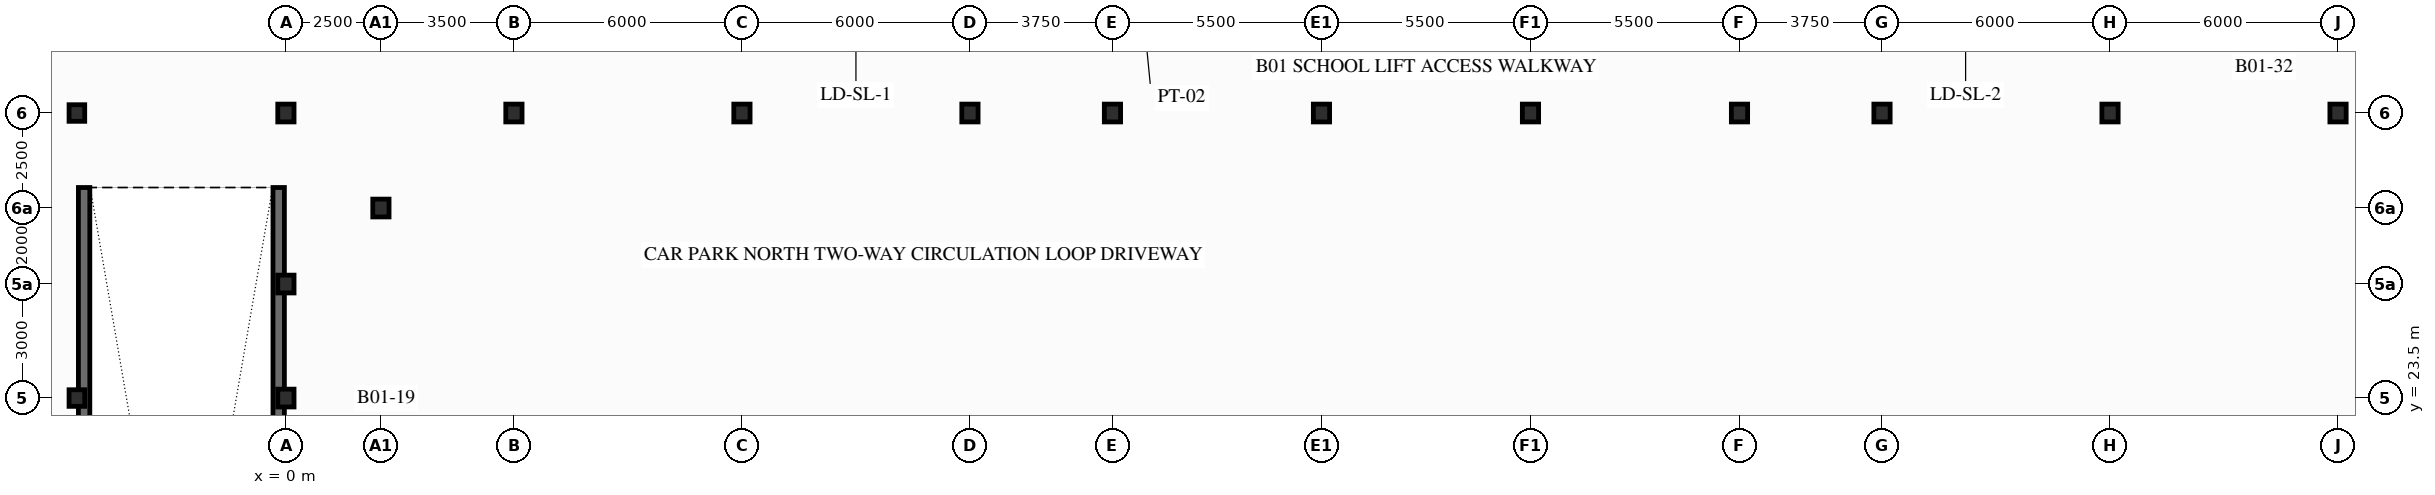
"""IFC4 building model, lengths in metres.
Left out: names, types, materials, properties, quantities, classifications, styles, units other than length and angle.
Written with IfcOpenShell. Run it as: python <this file> out.ifc"""

import sys

from ifc_helpers import new_model, si_unit, direction, frame, frame_2d, origin, origin_2d, place, context, subcontext, project, spatial, rectangle, i_section, extrude, element, save


model = new_model("IFC4")
c1 = context("Model", 3, precision=1e-05, world=origin(), true_north=direction((0.0, 1.0)))
c2 = subcontext(c1, "Body", "Model", "MODEL_VIEW")
j1 = project(units=[si_unit("LENGTHUNIT", "METRE"), si_unit("PLANEANGLEUNIT", "RADIAN")], contexts=[c1])
p1 = place(None, origin())
s1 = spatial("IfcSite", under=j1, at=p1, CompositionType="ELEMENT")
p2 = place(p1, origin())
s2 = spatial("IfcBuilding", under=s1, at=p2, CompositionType="ELEMENT")
p3 = place(p2, frame((0.0, 0.0, -4.2)))
s3 = spatial("IfcBuildingStorey", under=s2, at=p3, CompositionType="ELEMENT", Elevation=-4.2)
for number, where, z_axis, x_axis in (
    (1, (-5.5, 23.5, 0.0), (0.0, 0.0, 1.0), (1.0, 0.0, 0.0)),
    (2, (-5.5, 31.0, 0.0), (0.0, 0.0, 1.0), (1.0, 0.0, 0.0)),
):
    element("IfcColumn", number, at=place(p3, frame(where, z_axis=z_axis, x_axis=x_axis)), inside=s3, PredefinedType="COLUMN", context=c2, shape_type="SweptSolid", body=[
        extrude(i_section(OverallWidth=0.412, OverallDepth=0.437, WebThickness=0.036, FlangeThickness=0.058, FilletRadius=0.015, at=origin_2d()), origin(), (0.0, 0.0, 1.0), 4.2),
    ])
for number, where, z_axis, x_axis in (
    (3, (0.0, 23.5, 0.0), (0.0, 0.0, 1.0), (1.0, 0.0, 0.0)),
    (4, (0.0, 26.5, 0.0), (0.0, 0.0, 1.0), (1.0, 0.0, 0.0)),
    (5, (0.0, 31.0, 0.0), (0.0, 0.0, 1.0), (1.0, 0.0, 0.0)),
    (6, (2.5, 28.5, 0.0), (0.0, 0.0, 1.0), (1.0, 0.0, 0.0)),
    (7, (6.0, 31.0, 0.0), (0.0, 0.0, 1.0), (1.0, 0.0, 0.0)),
    (8, (12.0, 31.0, 0.0), (0.0, 0.0, 1.0), (1.0, 0.0, 0.0)),
    (9, (18.0, 31.0, 0.0), (0.0, 0.0, 1.0), (1.0, 0.0, 0.0)),
    (10, (21.75, 31.0, 0.0), (0.0, 0.0, 1.0), (1.0, 0.0, 0.0)),
    (11, (27.25, 31.0, 0.0), (0.0, 0.0, 1.0), (1.0, 0.0, 0.0)),
    (12, (32.75, 31.0, 0.0), (0.0, 0.0, 1.0), (1.0, 0.0, 0.0)),
    (13, (38.25, 31.0, 0.0), (0.0, 0.0, 1.0), (1.0, 0.0, 0.0)),
    (14, (42.0, 31.0, 0.0), (0.0, 0.0, 1.0), (1.0, 0.0, 0.0)),
    (15, (48.0, 31.0, 0.0), (0.0, 0.0, 1.0), (1.0, 0.0, 0.0)),
    (16, (54.0, 31.0, 0.0), (0.0, 0.0, 1.0), (1.0, 0.0, 0.0)),
):
    element("IfcColumn", number, at=place(p3, frame(where, z_axis=z_axis, x_axis=x_axis)), inside=s3, PredefinedType="COLUMN", context=c2, shape_type="SweptSolid", body=[
        extrude(i_section(OverallWidth=0.428, OverallDepth=0.469, WebThickness=0.078, FlangeThickness=0.125, FilletRadius=0.015, at=origin_2d()), origin(), (0.0, 0.0, 1.0), 4.2),
    ])
for number, where, z_axis, x_axis in (
    (17, (-5.31, 1.2, 0.0), (0.0, 0.0, 1.0), (0.0, 1.0, 0.0)),
    (18, (-0.19, 1.2, 0.0), (0.0, 0.0, 1.0), (0.0, 1.0, 0.0)),
):
    element("IfcWall", number, at=place(p3, frame(where, z_axis=z_axis, x_axis=x_axis)), inside=s3, PredefinedType="SHEAR", context=c2, shape_type="SweptSolid", body=[
        extrude(rectangle(XDim=27.84, YDim=0.3, at=frame_2d((13.92, 0.0))), origin(), (0.0, 0.0, 1.0), 3.86),
    ])
save(model, sys.argv[1])
